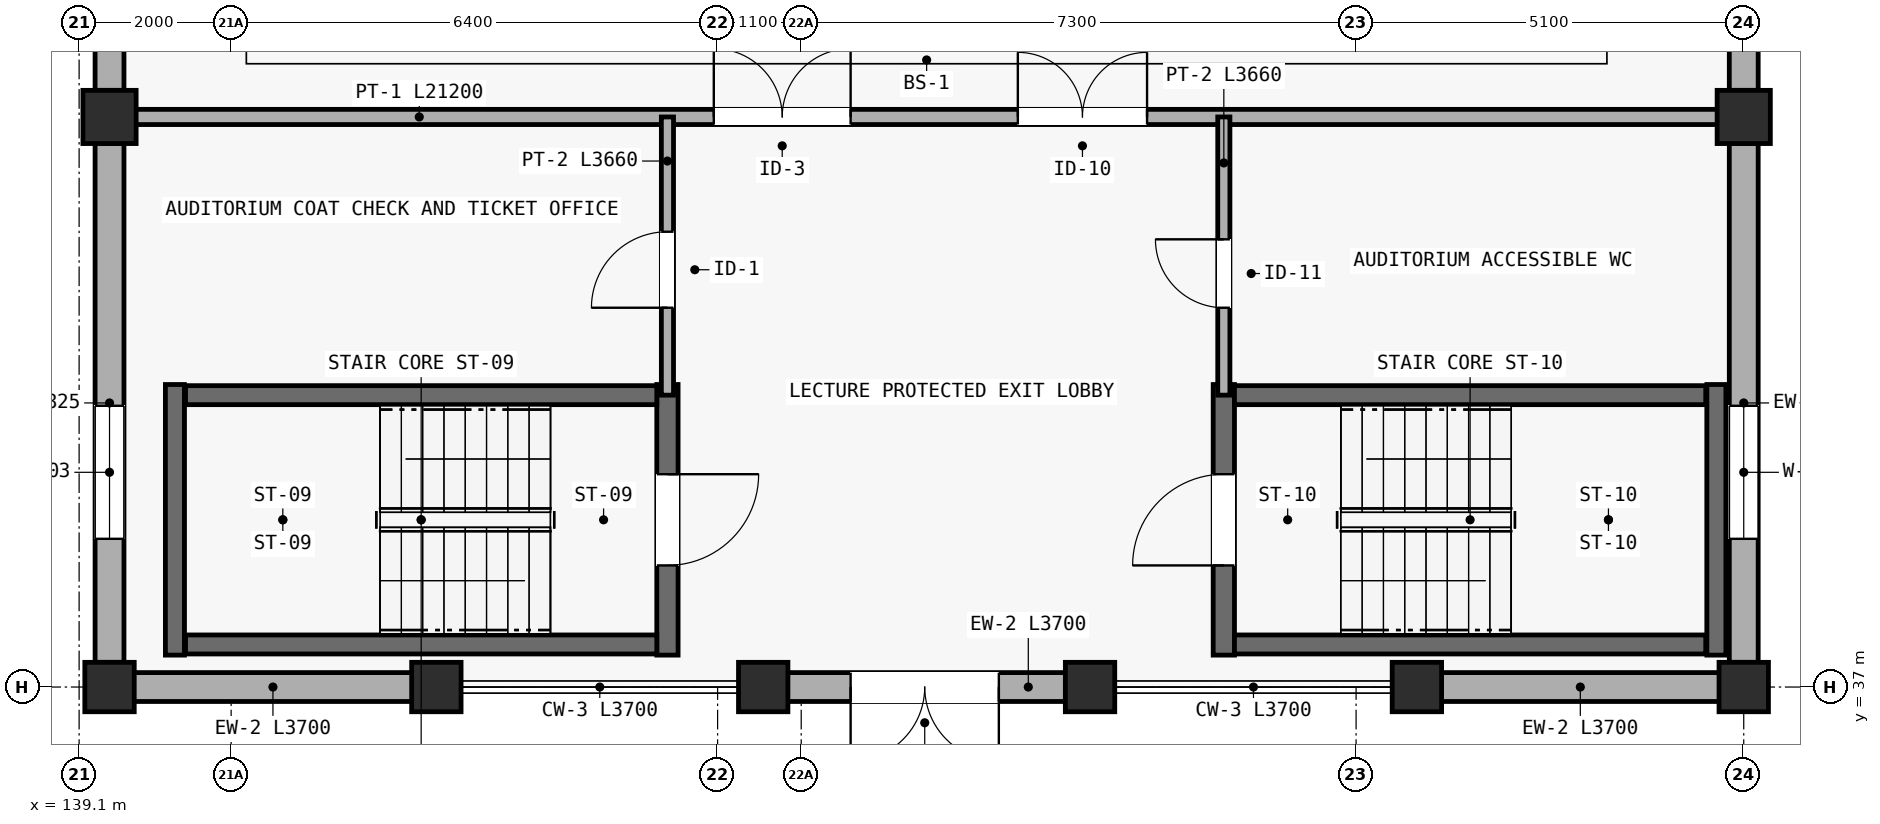
"""IFC4 building model, lengths in metres.
Left out: names, types, materials, properties, quantities, classifications, styles, units other than length and angle.
Written with IfcOpenShell. Run it as: python <this file> out.ifc"""

import sys

from ifc_helpers import new_model, si_unit, direction, frame, frame_2d, origin, origin_2d, place, context, subcontext, project, spatial, rectangle, extrude, element, fill, save


model = new_model("IFC4")
c1 = context("Model", 3, precision=1e-05, world=origin(), true_north=direction((0.0, 1.0)))
c2 = subcontext(c1, "Body", "Model", "MODEL_VIEW")
j1 = project(units=[si_unit("LENGTHUNIT", "METRE"), si_unit("PLANEANGLEUNIT", "RADIAN")], contexts=[c1])
p1 = place(None, origin())
s1 = spatial("IfcSite", under=j1, at=p1, CompositionType="ELEMENT")
p2 = place(p1, origin())
s2 = spatial("IfcBuilding", under=s1, at=p2, CompositionType="ELEMENT")
p3 = place(p2, origin())
s3 = spatial("IfcBuildingStorey", under=s2, at=p3, CompositionType="ELEMENT", Elevation=0.0)
for number, where, z_axis, x_axis in (
    (1, (139.5, 37.0, 0.0), (0.0, 0.0, 1.0), (1.0, 0.0, 0.0)),
    (2, (143.8, 37.0, 0.0), (0.0, 0.0, 1.0), (1.0, 0.0, 0.0)),
    (3, (148.1, 37.0, 0.0), (0.0, 0.0, 1.0), (1.0, 0.0, 0.0)),
    (4, (152.4, 37.0, 0.0), (0.0, 0.0, 1.0), (1.0, 0.0, 0.0)),
    (5, (156.7, 37.0, 0.0), (0.0, 0.0, 1.0), (1.0, 0.0, 0.0)),
    (6, (161.0, 37.0, 0.0), (0.0, 0.0, 1.0), (1.0, 0.0, 0.0)),
):
    element("IfcColumn", number, at=place(p3, frame(where, z_axis=z_axis, x_axis=x_axis)), inside=s3, PredefinedType="COLUMN", context=c2, shape_type="SweptSolid", body=[
        extrude(rectangle(XDim=0.65, YDim=0.65, at=origin_2d()), origin(), (0.0, 0.0, 1.0), 5.85),
    ])
for number, where, z_axis, x_axis in (
    (7, (139.5, 44.5, 0.0), (0.0, 0.0, 1.0), (1.0, 0.0, 0.0)),
    (8, (161.0, 44.5, 0.0), (0.0, 0.0, 1.0), (1.0, 0.0, 0.0)),
):
    element("IfcColumn", number, at=place(p3, frame(where, z_axis=z_axis, x_axis=x_axis)), inside=s3, PredefinedType="COLUMN", context=c2, shape_type="SweptSolid", body=[
        extrude(rectangle(XDim=0.7, YDim=0.7, at=origin_2d()), origin(), (0.0, 0.0, 1.0), 5.85),
    ])
p4 = place(p3, frame((139.8, 37.0, 0.0), z_axis=(0.0, 0.0, 1.0), x_axis=(1.0, 0.0, 0.0)))
e9 = element("IfcWall", 9, at=p4, inside=s3, PredefinedType="STANDARD", context=c2, shape_type="SweptSolid", body=[
    extrude(rectangle(XDim=3.7, YDim=0.38, at=frame_2d((1.85, 0.0))), origin(), (0.0, 0.0, 1.0), 4.2),
])
p5 = place(p3, frame((148.4, 37.0, 0.0), z_axis=(0.0, 0.0, 1.0), x_axis=(1.0, 0.0, 0.0)))
e10 = element("IfcWall", 10, at=p5, inside=s3, PredefinedType="STANDARD", context=c2, shape_type="SweptSolid", body=[
    extrude(rectangle(XDim=3.7, YDim=0.38, at=frame_2d((1.85, 0.0))), origin(), (0.0, 0.0, 1.0), 5.05),
])
p6 = place(p5, frame((0.85, 0.0, 0.0)))
e11 = element("IfcOpeningElement", 11, at=p6, cuts=e10, PredefinedType="OPENING", context=c2, shape_type="SweptSolid", body=[
    extrude(rectangle(XDim=1.95, YDim=2.3, at=frame_2d((0.975, 1.15))), frame((0.0, 0.2, 0.0), z_axis=(0.0, -1.0, 0.0), x_axis=(1.0, 0.0, 0.0)), (0.0, 0.0, 1.0), 0.4),
])
p7 = place(p3, frame((157.0, 37.0, 0.0), z_axis=(0.0, 0.0, 1.0), x_axis=(1.0, 0.0, 0.0)))
e12 = element("IfcWall", 12, at=p7, inside=s3, PredefinedType="STANDARD", context=c2, shape_type="SweptSolid", body=[
    extrude(rectangle(XDim=3.7, YDim=0.38, at=frame_2d((1.85, 0.0))), origin(), (0.0, 0.0, 1.0), 4.2),
])
p8 = place(p3, frame((139.5, 37.325, 0.0), z_axis=(0.0, 0.0, 1.0), x_axis=(0.0, 1.0, 0.0)))
e13 = element("IfcWall", 13, at=p8, inside=s3, PredefinedType="STANDARD", context=c2, shape_type="SweptSolid", body=[
    extrude(rectangle(XDim=6.825, YDim=0.38, at=frame_2d((3.413, 0.0))), origin(), (0.0, 0.0, 1.0), 5.05),
])
p9 = place(p8, frame((1.625, 0.0, 0.9)))
e14 = element("IfcOpeningElement", 14, at=p9, cuts=e13, PredefinedType="OPENING", context=c2, shape_type="SweptSolid", body=[
    extrude(rectangle(XDim=1.75, YDim=1.55, at=frame_2d((0.875, 0.775))), frame((0.0, 0.2, 0.0), z_axis=(0.0, -1.0, 0.0), x_axis=(1.0, 0.0, 0.0)), (0.0, 0.0, 1.0), 0.4),
])
p10 = place(p3, frame((139.5, 44.85, 0.0), z_axis=(0.0, 0.0, 1.0), x_axis=(0.0, 1.0, 0.0)))
e15 = element("IfcWall", 15, at=p10, inside=s3, PredefinedType="STANDARD", context=c2, shape_type="SweptSolid", body=[
    extrude(rectangle(XDim=10.825, YDim=0.38, at=frame_2d((5.413, 0.0))), origin(), (0.0, 0.0, 1.0), 5.05),
])
p11 = place(p10, frame((1.6, 0.0, 0.9)))
e16 = element("IfcOpeningElement", 16, at=p11, cuts=e15, PredefinedType="OPENING", context=c2, shape_type="SweptSolid", body=[
    extrude(rectangle(XDim=1.75, YDim=1.55, at=frame_2d((0.875, 0.775))), frame((0.0, 0.2, 0.0), z_axis=(0.0, -1.0, 0.0), x_axis=(1.0, 0.0, 0.0)), (0.0, 0.0, 1.0), 0.4),
])
p12 = place(p10, frame((6.2, 0.0, 0.9)))
e17 = element("IfcOpeningElement", 17, at=p12, cuts=e15, PredefinedType="OPENING", context=c2, shape_type="SweptSolid", body=[
    extrude(rectangle(XDim=1.65, YDim=1.45, at=frame_2d((0.825, 0.725))), frame((0.0, 0.2, 0.0), z_axis=(0.0, -1.0, 0.0), x_axis=(1.0, 0.0, 0.0)), (0.0, 0.0, 1.0), 0.4),
])
p13 = place(p3, frame((161.0, 37.325, 0.0), z_axis=(0.0, 0.0, 1.0), x_axis=(0.0, 1.0, 0.0)))
e18 = element("IfcWall", 18, at=p13, inside=s3, PredefinedType="STANDARD", context=c2, shape_type="SweptSolid", body=[
    extrude(rectangle(XDim=6.825, YDim=0.38, at=frame_2d((3.413, 0.0))), origin(), (0.0, 0.0, 1.0), 5.05),
])
p14 = place(p13, frame((1.625, 0.0, 0.9)))
e19 = element("IfcOpeningElement", 19, at=p14, cuts=e18, PredefinedType="OPENING", context=c2, shape_type="SweptSolid", body=[
    extrude(rectangle(XDim=1.75, YDim=1.55, at=frame_2d((0.875, 0.775))), frame((0.0, 0.2, 0.0), z_axis=(0.0, -1.0, 0.0), x_axis=(1.0, 0.0, 0.0)), (0.0, 0.0, 1.0), 0.4),
])
p15 = place(p3, frame((161.0, 44.85, 0.0), z_axis=(0.0, 0.0, 1.0), x_axis=(0.0, 1.0, 0.0)))
e20 = element("IfcWall", 20, at=p15, inside=s3, PredefinedType="STANDARD", context=c2, shape_type="SweptSolid", body=[
    extrude(rectangle(XDim=10.825, YDim=0.38, at=frame_2d((5.413, 0.0))), origin(), (0.0, 0.0, 1.0), 5.05),
])
p16 = place(p15, frame((1.6, 0.0, 0.9)))
e21 = element("IfcOpeningElement", 21, at=p16, cuts=e20, PredefinedType="OPENING", context=c2, shape_type="SweptSolid", body=[
    extrude(rectangle(XDim=1.75, YDim=1.55, at=frame_2d((0.875, 0.775))), frame((0.0, 0.2, 0.0), z_axis=(0.0, -1.0, 0.0), x_axis=(1.0, 0.0, 0.0)), (0.0, 0.0, 1.0), 0.4),
])
p17 = place(p15, frame((6.2, 0.0, 0.9)))
e22 = element("IfcOpeningElement", 22, at=p17, cuts=e20, PredefinedType="OPENING", context=c2, shape_type="SweptSolid", body=[
    extrude(rectangle(XDim=1.65, YDim=1.45, at=frame_2d((0.825, 0.725))), frame((0.0, 0.2, 0.0), z_axis=(0.0, -1.0, 0.0), x_axis=(1.0, 0.0, 0.0)), (0.0, 0.0, 1.0), 0.4),
])
p18 = place(p3, frame((146.84, 40.98, 0.0), z_axis=(0.0, 0.0, 1.0), x_axis=(0.0, -1.0, 0.0)))
e23 = element("IfcWall", 23, at=p18, inside=s3, PredefinedType="SHEAR", context=c2, shape_type="SweptSolid", body=[
    extrude(rectangle(XDim=3.56, YDim=0.28, at=frame_2d((1.78, 0.0))), origin(), (0.0, 0.0, 1.0), 5.6),
])
p19 = place(p18, frame((1.18, 0.0, 0.0)))
e24 = element("IfcOpeningElement", 24, at=p19, cuts=e23, PredefinedType="OPENING", context=c2, shape_type="SweptSolid", body=[
    extrude(rectangle(XDim=1.2, YDim=2.15, at=frame_2d((0.6, 1.075))), frame((0.0, 0.15, 0.0), z_axis=(0.0, -1.0, 0.0), x_axis=(1.0, 0.0, 0.0)), (0.0, 0.0, 1.0), 0.3),
])
p20 = place(p3, frame((140.36, 37.42, 0.0), z_axis=(0.0, 0.0, 1.0), x_axis=(0.0, 1.0, 0.0)))
e25 = element("IfcWall", 25, at=p20, inside=s3, PredefinedType="SHEAR", context=c2, shape_type="SweptSolid", body=[
    extrude(rectangle(XDim=3.56, YDim=0.25, at=frame_2d((1.78, 0.0))), origin(), (0.0, 0.0, 1.0), 5.6),
])
for number, where, z_axis, x_axis in (
    (26, (146.7, 40.84, 0.0), (0.0, 0.0, 1.0), (-1.0, 0.0, 0.0)),
    (27, (140.5, 37.56, 0.0), (0.0, 0.0, 1.0), (1.0, 0.0, 0.0)),
):
    element("IfcWall", number, at=place(p3, frame(where, z_axis=z_axis, x_axis=x_axis)), inside=s3, PredefinedType="SHEAR", context=c2, shape_type="SweptSolid", body=[
        extrude(rectangle(XDim=6.2, YDim=0.25, at=frame_2d((3.1, 0.0))), origin(), (0.0, 0.0, 1.0), 5.6),
    ])
p21 = place(p3, frame((154.16, 37.42, 0.0), z_axis=(0.0, 0.0, 1.0), x_axis=(0.0, 1.0, 0.0)))
e28 = element("IfcWall", 28, at=p21, inside=s3, PredefinedType="SHEAR", context=c2, shape_type="SweptSolid", body=[
    extrude(rectangle(XDim=3.56, YDim=0.28, at=frame_2d((1.78, 0.0))), origin(), (0.0, 0.0, 1.0), 5.6),
])
p22 = place(p21, frame((1.18, 0.0, 0.0)))
e29 = element("IfcOpeningElement", 29, at=p22, cuts=e28, PredefinedType="OPENING", context=c2, shape_type="SweptSolid", body=[
    extrude(rectangle(XDim=1.2, YDim=2.15, at=frame_2d((0.6, 1.075))), frame((0.0, 0.15, 0.0), z_axis=(0.0, -1.0, 0.0), x_axis=(1.0, 0.0, 0.0)), (0.0, 0.0, 1.0), 0.3),
])
p23 = place(p3, frame((160.64, 40.98, 0.0), z_axis=(0.0, 0.0, 1.0), x_axis=(0.0, -1.0, 0.0)))
e30 = element("IfcWall", 30, at=p23, inside=s3, PredefinedType="SHEAR", context=c2, shape_type="SweptSolid", body=[
    extrude(rectangle(XDim=3.56, YDim=0.25, at=frame_2d((1.78, 0.0))), origin(), (0.0, 0.0, 1.0), 5.6),
])
for number, where, z_axis, x_axis in (
    (31, (154.3, 37.56, 0.0), (0.0, 0.0, 1.0), (1.0, 0.0, 0.0)),
    (32, (160.5, 40.84, 0.0), (0.0, 0.0, 1.0), (-1.0, 0.0, 0.0)),
):
    element("IfcWall", number, at=place(p3, frame(where, z_axis=z_axis, x_axis=x_axis)), inside=s3, PredefinedType="SHEAR", context=c2, shape_type="SweptSolid", body=[
        extrude(rectangle(XDim=6.2, YDim=0.25, at=frame_2d((3.1, 0.0))), origin(), (0.0, 0.0, 1.0), 5.6),
    ])
p24 = place(p3, frame((139.65, 44.5, 0.0), z_axis=(0.0, 0.0, 1.0), x_axis=(1.0, 0.0, 0.0)))
e33 = element("IfcWall", 33, at=p24, inside=s3, PredefinedType="PARTITIONING", context=c2, shape_type="SweptSolid", body=[
    extrude(rectangle(XDim=21.2, YDim=0.2, at=frame_2d((10.6, 0.0))), origin(), (0.0, 0.0, 1.0), 4.74),
])
p25 = place(p24, frame((7.8, 0.0, 0.0)))
e34 = element("IfcOpeningElement", 34, at=p25, cuts=e33, PredefinedType="OPENING", context=c2, shape_type="SweptSolid", body=[
    extrude(rectangle(XDim=1.8, YDim=2.18, at=frame_2d((0.9, 1.09))), frame((0.0, 0.11, 0.0), z_axis=(0.0, -1.0, 0.0), x_axis=(1.0, 0.0, 0.0)), (0.0, 0.0, 1.0), 0.22),
])
p26 = place(p24, frame((11.8, 0.0, 0.0)))
e35 = element("IfcOpeningElement", 35, at=p26, cuts=e33, PredefinedType="OPENING", context=c2, shape_type="SweptSolid", body=[
    extrude(rectangle(XDim=1.7, YDim=2.16, at=frame_2d((0.85, 1.08))), frame((0.0, 0.11, 0.0), z_axis=(0.0, -1.0, 0.0), x_axis=(1.0, 0.0, 0.0)), (0.0, 0.0, 1.0), 0.22),
])
p27 = place(p3, frame((146.84, 40.84, 0.0), z_axis=(0.0, 0.0, 1.0), x_axis=(0.0, 1.0, 0.0)))
e36 = element("IfcWall", 36, at=p27, inside=s3, PredefinedType="PARTITIONING", context=c2, shape_type="SweptSolid", body=[
    extrude(rectangle(XDim=3.66, YDim=0.16, at=frame_2d((1.83, 0.0))), origin(), (0.0, 0.0, 1.0), 5.0),
])
p28 = place(p27, frame((1.15, 0.0, 0.0)))
e37 = element("IfcOpeningElement", 37, at=p28, cuts=e36, PredefinedType="OPENING", context=c2, shape_type="SweptSolid", body=[
    extrude(rectangle(XDim=1.0, YDim=2.12, at=frame_2d((0.5, 1.06))), frame((0.0, 0.09, 0.0), z_axis=(0.0, -1.0, 0.0), x_axis=(1.0, 0.0, 0.0)), (0.0, 0.0, 1.0), 0.18),
])
p29 = place(p3, frame((154.16, 40.84, 0.0), z_axis=(0.0, 0.0, 1.0), x_axis=(0.0, 1.0, 0.0)))
e38 = element("IfcWall", 38, at=p29, inside=s3, PredefinedType="PARTITIONING", context=c2, shape_type="SweptSolid", body=[
    extrude(rectangle(XDim=3.66, YDim=0.16, at=frame_2d((1.83, 0.0))), origin(), (0.0, 0.0, 1.0), 5.0),
])
p30 = place(p29, frame((1.15, 0.0, 0.0)))
e39 = element("IfcOpeningElement", 39, at=p30, cuts=e38, PredefinedType="OPENING", context=c2, shape_type="SweptSolid", body=[
    extrude(rectangle(XDim=0.9, YDim=2.08, at=frame_2d((0.45, 1.04))), frame((0.0, 0.09, 0.0), z_axis=(0.0, -1.0, 0.0), x_axis=(1.0, 0.0, 0.0)), (0.0, 0.0, 1.0), 0.18),
])
p31 = place(p6, frame((1.95, 0.0, 0.0), z_axis=(0.0, 0.0, 1.0), x_axis=(-1.0, 0.0, 0.0)))
e40 = element("IfcDoor", 40, at=p31, inside=s3, OperationType="DOUBLE_DOOR_SINGLE_SWING", PredefinedType="DOOR", context=c2, shape_type="SweptSolid", body=[
    extrude(rectangle(XDim=1.95, YDim=2.3, at=frame_2d((0.975, 1.15))), frame((0.0, 0.025, 0.0), z_axis=(0.0, -1.0, 0.0), x_axis=(1.0, 0.0, 0.0)), (0.0, 0.0, 1.0), 0.05),
])
fill(e11, e40)
p32 = place(p9, origin())
e41 = element("IfcWindow", 41, at=p32, inside=s3, PartitioningType="DOUBLE_PANEL_VERTICAL", PredefinedType="WINDOW", context=c2, shape_type="SweptSolid", body=[
    extrude(rectangle(XDim=1.75, YDim=1.55, at=frame_2d((0.875, 0.775))), frame((0.0, 0.03, 0.0), z_axis=(0.0, -1.0, 0.0), x_axis=(1.0, 0.0, 0.0)), (0.0, 0.0, 1.0), 0.06),
])
fill(e14, e41)
p33 = place(p14, origin())
e42 = element("IfcWindow", 42, at=p33, inside=s3, PartitioningType="DOUBLE_PANEL_VERTICAL", PredefinedType="WINDOW", context=c2, shape_type="SweptSolid", body=[
    extrude(rectangle(XDim=1.75, YDim=1.55, at=frame_2d((0.875, 0.775))), frame((0.0, 0.03, 0.0), z_axis=(0.0, -1.0, 0.0), x_axis=(1.0, 0.0, 0.0)), (0.0, 0.0, 1.0), 0.06),
])
fill(e19, e42)
p34 = place(p19, origin())
e43 = element("IfcDoor", 43, at=p34, inside=s3, OperationType="SINGLE_SWING_LEFT", PredefinedType="DOOR", context=c2, shape_type="SweptSolid", body=[
    extrude(rectangle(XDim=1.2, YDim=2.15, at=frame_2d((0.6, 1.075))), frame((0.0, 0.025, 0.0), z_axis=(0.0, -1.0, 0.0), x_axis=(1.0, 0.0, 0.0)), (0.0, 0.0, 1.0), 0.05),
])
fill(e24, e43)
p35 = place(p22, origin())
e44 = element("IfcDoor", 44, at=p35, inside=s3, OperationType="SINGLE_SWING_LEFT", PredefinedType="DOOR", context=c2, shape_type="SweptSolid", body=[
    extrude(rectangle(XDim=1.2, YDim=2.15, at=frame_2d((0.6, 1.075))), frame((0.0, 0.025, 0.0), z_axis=(0.0, -1.0, 0.0), x_axis=(1.0, 0.0, 0.0)), (0.0, 0.0, 1.0), 0.05),
])
fill(e29, e44)
p36 = place(p25, origin())
e45 = element("IfcDoor", 45, at=p36, inside=s3, OperationType="DOUBLE_DOOR_SINGLE_SWING", PredefinedType="DOOR", context=c2, shape_type="SweptSolid", body=[
    extrude(rectangle(XDim=1.8, YDim=2.18, at=frame_2d((0.9, 1.09))), frame((0.0, 0.025, 0.0), z_axis=(0.0, -1.0, 0.0), x_axis=(1.0, 0.0, 0.0)), (0.0, 0.0, 1.0), 0.05),
])
fill(e34, e45)
p37 = place(p26, origin())
e46 = element("IfcDoor", 46, at=p37, inside=s3, OperationType="DOUBLE_DOOR_SINGLE_SWING", PredefinedType="DOOR", context=c2, shape_type="SweptSolid", body=[
    extrude(rectangle(XDim=1.7, YDim=2.16, at=frame_2d((0.85, 1.08))), frame((0.0, 0.025, 0.0), z_axis=(0.0, -1.0, 0.0), x_axis=(1.0, 0.0, 0.0)), (0.0, 0.0, 1.0), 0.05),
])
fill(e35, e46)
p38 = place(p28, origin())
e47 = element("IfcDoor", 47, at=p38, inside=s3, OperationType="SINGLE_SWING_LEFT", PredefinedType="DOOR", context=c2, shape_type="SweptSolid", body=[
    extrude(rectangle(XDim=1.0, YDim=2.12, at=frame_2d((0.5, 1.06))), frame((0.0, 0.025, 0.0), z_axis=(0.0, -1.0, 0.0), x_axis=(1.0, 0.0, 0.0)), (0.0, 0.0, 1.0), 0.05),
])
fill(e37, e47)
p39 = place(p30, origin())
e48 = element("IfcDoor", 48, at=p39, inside=s3, OperationType="SINGLE_SWING_RIGHT", PredefinedType="DOOR", context=c2, shape_type="SweptSolid", body=[
    extrude(rectangle(XDim=0.9, YDim=2.08, at=frame_2d((0.45, 1.04))), frame((0.0, 0.025, 0.0), z_axis=(0.0, -1.0, 0.0), x_axis=(1.0, 0.0, 0.0)), (0.0, 0.0, 1.0), 0.05),
])
fill(e39, e48)
save(model, sys.argv[1])
